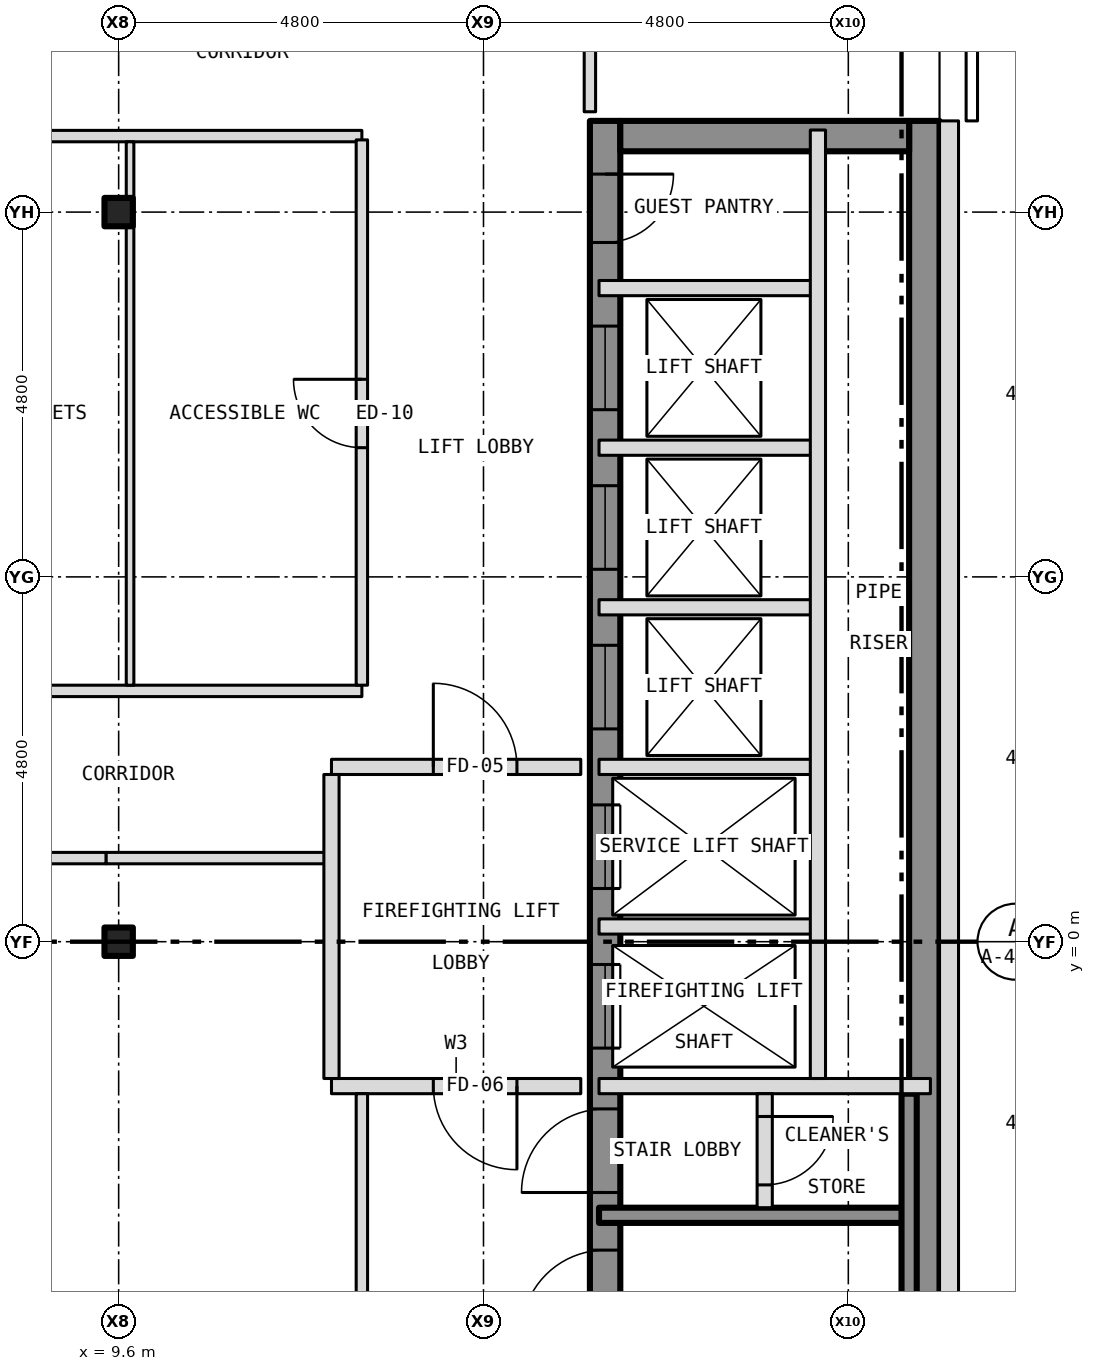
"""IFC4 building model, lengths in metres.
Left out: names, types, materials, properties, quantities, classifications, styles, units other than length and angle.
Written with IfcOpenShell. Run it as: python <this file> out.ifc"""

import sys

from ifc_helpers import new_model, si_unit, direction, frame, frame_2d, origin, origin_2d, place, context, subcontext, project, spatial, rectangle, i_section, extrude, element, fill, save


model = new_model("IFC4")
c1 = context("Model", 3, precision=1e-05, world=origin(), true_north=direction((0.0, 1.0)))
c2 = subcontext(c1, "Body", "Model", "MODEL_VIEW")
j1 = project(units=[si_unit("LENGTHUNIT", "METRE"), si_unit("PLANEANGLEUNIT", "RADIAN")], contexts=[c1])
p1 = place(None, origin())
s1 = spatial("IfcSite", under=j1, at=p1, CompositionType="ELEMENT")
p2 = place(p1, origin())
s2 = spatial("IfcBuilding", under=s1, at=p2, CompositionType="ELEMENT")
p3 = place(p2, frame((0.0, 0.0, 219.0)))
s3 = spatial("IfcBuildingStorey", under=s2, at=p3, CompositionType="ELEMENT", Elevation=219.0)
for number, where, z_axis, x_axis in (
    (1, (9.6, 0.0, -0.15), (0.0, 0.0, 1.0), (1.0, 0.0, 0.0)),
    (2, (9.6, 9.6, -0.15), (0.0, 0.0, 1.0), (1.0, 0.0, 0.0)),
):
    element("IfcColumn", number, at=place(p3, frame(where, z_axis=z_axis, x_axis=x_axis)), inside=s3, PredefinedType="COLUMN", context=c2, shape_type="SweptSolid", body=[
        extrude(i_section(OverallWidth=0.373, OverallDepth=0.373, WebThickness=0.016, FlangeThickness=0.026, at=origin_2d()), origin(), (0.0, 0.0, 1.0), 3.5),
    ])
p4 = place(p3, frame((16.0, -10.8, 0.0), z_axis=(0.0, 0.0, 1.0), x_axis=(0.0, 1.0, 0.0)))
e3 = element("IfcWall", 3, at=p4, inside=s3, PredefinedType="SHEAR", context=c2, shape_type="SweptSolid", body=[
    extrude(rectangle(XDim=21.6, YDim=0.4, at=frame_2d((10.8, 0.0))), origin(), (0.0, 0.0, 1.0), 3.25),
])
p5 = place(p4, frame((9.4, 0.0, 0.0)))
e4 = element("IfcOpeningElement", 4, at=p5, cuts=e3, PredefinedType="OPENING", context=c2, shape_type="SweptSolid", body=[
    extrude(rectangle(XDim=1.1, YDim=2.1, at=frame_2d((0.55, 1.05))), frame((0.0, 0.212, 0.0), z_axis=(0.0, -1.0, 0.0), x_axis=(1.0, 0.0, 0.0)), (0.0, 0.0, 1.0), 0.424),
])
p6 = place(p4, frame((11.5, 0.0, 0.0)))
e5 = element("IfcOpeningElement", 5, at=p6, cuts=e3, PredefinedType="OPENING", context=c2, shape_type="SweptSolid", body=[
    extrude(rectangle(XDim=1.1, YDim=2.1, at=frame_2d((0.55, 1.05))), frame((0.0, 0.212, 0.0), z_axis=(0.0, -1.0, 0.0), x_axis=(1.0, 0.0, 0.0)), (0.0, 0.0, 1.0), 0.424),
])
p7 = place(p4, frame((13.6, 0.0, 0.0)))
e6 = element("IfcOpeningElement", 6, at=p7, cuts=e3, PredefinedType="OPENING", context=c2, shape_type="SweptSolid", body=[
    extrude(rectangle(XDim=1.1, YDim=2.1, at=frame_2d((0.55, 1.05))), frame((0.0, 0.212, 0.0), z_axis=(0.0, -1.0, 0.0), x_axis=(1.0, 0.0, 0.0)), (0.0, 0.0, 1.0), 0.424),
])
p8 = place(p4, frame((15.7, 0.0, 0.0)))
e7 = element("IfcOpeningElement", 7, at=p8, cuts=e3, PredefinedType="OPENING", context=c2, shape_type="SweptSolid", body=[
    extrude(rectangle(XDim=1.1, YDim=2.1, at=frame_2d((0.55, 1.05))), frame((0.0, 0.212, 0.0), z_axis=(0.0, -1.0, 0.0), x_axis=(1.0, 0.0, 0.0)), (0.0, 0.0, 1.0), 0.424),
])
p9 = place(p4, frame((17.8, 0.0, 0.0)))
e8 = element("IfcOpeningElement", 8, at=p9, cuts=e3, PredefinedType="OPENING", context=c2, shape_type="SweptSolid", body=[
    extrude(rectangle(XDim=1.1, YDim=2.1, at=frame_2d((0.55, 1.05))), frame((0.0, 0.212, 0.0), z_axis=(0.0, -1.0, 0.0), x_axis=(1.0, 0.0, 0.0)), (0.0, 0.0, 1.0), 0.424),
])
p10 = place(p4, frame((5.642, 0.0, 0.0)))
e9 = element("IfcOpeningElement", 9, at=p10, cuts=e3, PredefinedType="OPENING", context=c2, shape_type="SweptSolid", body=[
    extrude(rectangle(XDim=1.1, YDim=2.1, at=frame_2d((0.55, 1.05))), frame((0.0, 0.212, 0.0), z_axis=(0.0, -1.0, 0.0), x_axis=(1.0, 0.0, 0.0)), (0.0, 0.0, 1.0), 0.424),
])
p11 = place(p4, frame((7.5, 0.0, 0.0)))
e10 = element("IfcOpeningElement", 10, at=p11, cuts=e3, PredefinedType="OPENING", context=c2, shape_type="SweptSolid", body=[
    extrude(rectangle(XDim=1.1, YDim=2.1, at=frame_2d((0.55, 1.05))), frame((0.0, 0.212, 0.0), z_axis=(0.0, -1.0, 0.0), x_axis=(1.0, 0.0, 0.0)), (0.0, 0.0, 1.0), 0.424),
])
p12 = place(p4, frame((20.0, 0.0, 0.0)))
e11 = element("IfcOpeningElement", 11, at=p12, cuts=e3, PredefinedType="OPENING", context=c2, shape_type="SweptSolid", body=[
    extrude(rectangle(XDim=0.9, YDim=2.1, at=frame_2d((0.45, 1.05))), frame((0.0, 0.212, 0.0), z_axis=(0.0, -1.0, 0.0), x_axis=(1.0, 0.0, 0.0)), (0.0, 0.0, 1.0), 0.424),
])
p13 = place(p3, frame((20.2, -10.8, 0.0), z_axis=(0.0, 0.0, 1.0), x_axis=(0.0, 1.0, 0.0)))
e12 = element("IfcWall", 12, at=p13, inside=s3, PredefinedType="SHEAR", context=c2, shape_type="SweptSolid", body=[
    extrude(rectangle(XDim=21.6, YDim=0.4, at=frame_2d((10.8, 0.0))), origin(), (0.0, 0.0, 1.0), 3.25),
])
p14 = place(p3, frame((16.2, 10.6, 0.0), z_axis=(0.0, 0.0, 1.0), x_axis=(1.0, 0.0, 0.0)))
e13 = element("IfcWall", 13, at=p14, inside=s3, PredefinedType="SHEAR", context=c2, shape_type="SweptSolid", body=[
    extrude(rectangle(XDim=3.8, YDim=0.4, at=frame_2d((1.9, 0.0))), origin(), (0.0, 0.0, 1.0), 3.25),
])
p15 = place(p3, frame((20.525, -10.8, 0.0), z_axis=(0.0, 0.0, 1.0), x_axis=(0.0, 1.0, 0.0)))
e14 = element("IfcWall", 14, at=p15, inside=s3, PredefinedType="SOLIDWALL", context=c2, shape_type="SweptSolid", body=[
    extrude(rectangle(XDim=21.6, YDim=0.25, at=frame_2d((10.8, 0.0))), origin(), (0.0, 0.0, 1.0), 3.5),
])
p16 = place(p15, frame((2.95, 0.0, 1.0)))
e15 = element("IfcOpeningElement", 15, at=p16, cuts=e14, PredefinedType="OPENING", context=c2, shape_type="SweptSolid", body=[
    extrude(rectangle(XDim=0.6, YDim=1.5, at=frame_2d((0.3, 0.75))), frame((0.0, 0.137, 0.0), z_axis=(0.0, -1.0, 0.0), x_axis=(1.0, 0.0, 0.0)), (0.0, 0.0, 1.0), 0.274),
])
p17 = place(p3, frame((15.92, -3.6, 0.0), z_axis=(0.0, 0.0, 1.0), x_axis=(1.0, 0.0, 0.0)))
e16 = element("IfcWall", 16, at=p17, inside=s3, PredefinedType="SHEAR", context=c2, shape_type="SweptSolid", body=[
    extrude(rectangle(XDim=4.08, YDim=0.2, at=frame_2d((2.04, 0.0))), origin(), (0.0, 0.0, 1.0), 3.25),
])
p18 = place(p3, frame((12.4, -1.9, 0.0), z_axis=(0.0, 0.0, 1.0), x_axis=(1.0, 0.0, 0.0)))
e17 = element("IfcWall", 17, at=p18, inside=s3, PredefinedType="PARTITIONING", context=c2, shape_type="SweptSolid", body=[
    extrude(rectangle(XDim=3.28, YDim=0.2, at=frame_2d((1.64, 0.0))), origin(), (0.0, 0.0, 1.0), 3.35),
])
p19 = place(p18, frame((1.34, 0.0, 0.0)))
e18 = element("IfcOpeningElement", 18, at=p19, cuts=e17, PredefinedType="OPENING", context=c2, shape_type="SweptSolid", body=[
    extrude(rectangle(XDim=1.1, YDim=2.1, at=frame_2d((0.55, 1.05))), frame((0.0, 0.112, 0.0), z_axis=(0.0, -1.0, 0.0), x_axis=(1.0, 0.0, 0.0)), (0.0, 0.0, 1.0), 0.224),
])
p20 = place(p3, frame((15.92, -1.9, 0.0), z_axis=(0.0, 0.0, 1.0), x_axis=(1.0, 0.0, 0.0)))
e19 = element("IfcWall", 19, at=p20, inside=s3, PredefinedType="PARTITIONING", context=c2, shape_type="SweptSolid", body=[
    extrude(rectangle(XDim=4.36, YDim=0.2, at=frame_2d((2.18, 0.0))), origin(), (0.0, 0.0, 1.0), 3.25),
])
p21 = place(p3, frame((15.92, 0.2, 0.0), z_axis=(0.0, 0.0, 1.0), x_axis=(1.0, 0.0, 0.0)))
e20 = element("IfcWall", 20, at=p21, inside=s3, PredefinedType="PARTITIONING", context=c2, shape_type="SweptSolid", body=[
    extrude(rectangle(XDim=2.88, YDim=0.2, at=frame_2d((1.44, 0.0))), origin(), (0.0, 0.0, 1.0), 3.25),
])
p22 = place(p3, frame((6.62, 1.1, 0.0), z_axis=(0.0, 0.0, 1.0), x_axis=(1.0, 0.0, 0.0)))
e21 = element("IfcWall", 21, at=p22, inside=s3, PredefinedType="PARTITIONING", context=c2, shape_type="SweptSolid", body=[
    extrude(rectangle(XDim=2.816, YDim=0.15, at=frame_2d((1.408, 0.0))), origin(), (0.0, 0.0, 1.0), 2.593),
])
p23 = place(p3, frame((9.436, 1.1, 0.0), z_axis=(0.0, 0.0, 1.0), x_axis=(1.0, 0.0, 0.0)))
e22 = element("IfcWall", 22, at=p23, inside=s3, PredefinedType="PARTITIONING", context=c2, shape_type="SweptSolid", body=[
    extrude(rectangle(XDim=2.964, YDim=0.15, at=frame_2d((1.482, 0.0))), origin(), (0.0, 0.0, 1.0), 3.35),
])
p24 = place(p3, frame((12.4, 2.3, 0.0), z_axis=(0.0, 0.0, 1.0), x_axis=(1.0, 0.0, 0.0)))
e23 = element("IfcWall", 23, at=p24, inside=s3, PredefinedType="PARTITIONING", context=c2, shape_type="SweptSolid", body=[
    extrude(rectangle(XDim=3.28, YDim=0.2, at=frame_2d((1.64, 0.0))), origin(), (0.0, 0.0, 1.0), 3.35),
])
p25 = place(p24, frame((1.34, 0.0, 0.0)))
e24 = element("IfcOpeningElement", 24, at=p25, cuts=e23, PredefinedType="OPENING", context=c2, shape_type="SweptSolid", body=[
    extrude(rectangle(XDim=1.1, YDim=2.1, at=frame_2d((0.55, 1.05))), frame((0.0, 0.112, 0.0), z_axis=(0.0, -1.0, 0.0), x_axis=(1.0, 0.0, 0.0)), (0.0, 0.0, 1.0), 0.224),
])
p26 = place(p3, frame((15.92, 2.3, 0.0), z_axis=(0.0, 0.0, 1.0), x_axis=(1.0, 0.0, 0.0)))
e25 = element("IfcWall", 25, at=p26, inside=s3, PredefinedType="PARTITIONING", context=c2, shape_type="SweptSolid", body=[
    extrude(rectangle(XDim=2.88, YDim=0.2, at=frame_2d((1.44, 0.0))), origin(), (0.0, 0.0, 1.0), 3.25),
])
p27 = place(p3, frame((6.65, 3.3, 0.0), z_axis=(0.0, 0.0, 1.0), x_axis=(1.0, 0.0, 0.0)))
e26 = element("IfcWall", 26, at=p27, inside=s3, PredefinedType="PARTITIONING", context=c2, shape_type="SweptSolid", body=[
    extrude(rectangle(XDim=6.15, YDim=0.15, at=frame_2d((3.075, 0.0))), origin(), (0.0, 0.0, 1.0), 3.35),
])
p28 = place(p27, frame((1.087, 0.0, 0.0)))
e27 = element("IfcOpeningElement", 27, at=p28, cuts=e26, PredefinedType="OPENING", context=c2, shape_type="SweptSolid", body=[
    extrude(rectangle(XDim=0.9, YDim=2.1, at=frame_2d((0.45, 1.05))), frame((0.0, 0.087, 0.0), z_axis=(0.0, -1.0, 0.0), x_axis=(1.0, 0.0, 0.0)), (0.0, 0.0, 1.0), 0.174),
])
for number, where, z_axis, x_axis in (
    (28, (15.92, 4.4, 0.0), (0.0, 0.0, 1.0), (1.0, 0.0, 0.0)),
    (29, (15.92, 6.5, 0.0), (0.0, 0.0, 1.0), (1.0, 0.0, 0.0)),
    (30, (15.92, 8.6, 0.0), (0.0, 0.0, 1.0), (1.0, 0.0, 0.0)),
):
    element("IfcWall", number, at=place(p3, frame(where, z_axis=z_axis, x_axis=x_axis)), inside=s3, PredefinedType="PARTITIONING", context=c2, shape_type="SweptSolid", body=[
        extrude(rectangle(XDim=2.88, YDim=0.2, at=frame_2d((1.44, 0.0))), origin(), (0.0, 0.0, 1.0), 3.25),
    ])
p29 = place(p3, frame((6.65, 10.6, 0.0), z_axis=(0.0, 0.0, 1.0), x_axis=(1.0, 0.0, 0.0)))
e31 = element("IfcWall", 31, at=p29, inside=s3, PredefinedType="PARTITIONING", context=c2, shape_type="SweptSolid", body=[
    extrude(rectangle(XDim=6.15, YDim=0.15, at=frame_2d((3.075, 0.0))), origin(), (0.0, 0.0, 1.0), 3.35),
])
p30 = place(p3, frame((9.75, 3.375, 0.0), z_axis=(0.0, 0.0, 1.0), x_axis=(0.0, 1.0, 0.0)))
e32 = element("IfcWall", 32, at=p30, inside=s3, PredefinedType="PARTITIONING", context=c2, shape_type="SweptSolid", body=[
    extrude(rectangle(XDim=6.038, YDim=0.1, at=frame_2d((3.019, 0.0))), origin(), (0.0, 0.0, 1.0), 2.728),
])
p31 = place(p3, frame((9.75, 9.413, 0.0), z_axis=(0.0, 0.0, 1.0), x_axis=(0.0, 1.0, 0.0)))
e33 = element("IfcWall", 33, at=p31, inside=s3, PredefinedType="PARTITIONING", context=c2, shape_type="SweptSolid", body=[
    extrude(rectangle(XDim=0.374, YDim=0.1, at=frame_2d((0.187, 0.0))), origin(), (0.0, 0.0, 1.0), 3.35),
])
p32 = place(p3, frame((9.75, 9.787, 0.0), z_axis=(0.0, 0.0, 1.0), x_axis=(0.0, 1.0, 0.0)))
e34 = element("IfcWall", 34, at=p32, inside=s3, PredefinedType="PARTITIONING", context=c2, shape_type="SweptSolid", body=[
    extrude(rectangle(XDim=0.738, YDim=0.1, at=frame_2d((0.369, 0.0))), origin(), (0.0, 0.0, 1.0), 2.728),
])
p33 = place(p3, frame((12.4, -1.8, 0.0), z_axis=(0.0, 0.0, 1.0), x_axis=(0.0, 1.0, 0.0)))
e35 = element("IfcWall", 35, at=p33, inside=s3, PredefinedType="PARTITIONING", context=c2, shape_type="SweptSolid", body=[
    extrude(rectangle(XDim=4.0, YDim=0.2, at=frame_2d((2.0, 0.0))), origin(), (0.0, 0.0, 1.0), 3.35),
])
p34 = place(p3, frame((12.8, -10.525, 0.0), z_axis=(0.0, 0.0, 1.0), x_axis=(0.0, 1.0, 0.0)))
e36 = element("IfcWall", 36, at=p34, inside=s3, PredefinedType="PARTITIONING", context=c2, shape_type="SweptSolid", body=[
    extrude(rectangle(XDim=8.525, YDim=0.15, at=frame_2d((4.262, 0.0))), origin(), (0.0, 0.0, 1.0), 3.35),
])
p35 = place(p34, frame((3.825, 0.0, 0.0)))
e37 = element("IfcOpeningElement", 37, at=p35, cuts=e36, PredefinedType="OPENING", context=c2, shape_type="SweptSolid", body=[
    extrude(rectangle(XDim=0.9, YDim=2.1, at=frame_2d((0.45, 1.05))), frame((0.0, 0.087, 0.0), z_axis=(0.0, -1.0, 0.0), x_axis=(1.0, 0.0, 0.0)), (0.0, 0.0, 1.0), 0.174),
])
p36 = place(p3, frame((12.8, 3.375, 0.0), z_axis=(0.0, 0.0, 1.0), x_axis=(0.0, 1.0, 0.0)))
e38 = element("IfcWall", 38, at=p36, inside=s3, PredefinedType="PARTITIONING", context=c2, shape_type="SweptSolid", body=[
    extrude(rectangle(XDim=7.175, YDim=0.15, at=frame_2d((3.587, 0.0))), origin(), (0.0, 0.0, 1.0), 3.35),
])
p37 = place(p36, frame((3.125, 0.0, 0.0)))
e39 = element("IfcOpeningElement", 39, at=p37, cuts=e38, PredefinedType="OPENING", context=c2, shape_type="SweptSolid", body=[
    extrude(rectangle(XDim=0.9, YDim=2.1, at=frame_2d((0.45, 1.05))), frame((0.0, 0.087, 0.0), z_axis=(0.0, -1.0, 0.0), x_axis=(1.0, 0.0, 0.0)), (0.0, 0.0, 1.0), 0.174),
])
p38 = place(p3, frame((15.8, 10.92, 0.0), z_axis=(0.0, 0.0, 1.0), x_axis=(0.0, 1.0, 0.0)))
e40 = element("IfcWall", 40, at=p38, inside=s3, PredefinedType="PARTITIONING", context=c2, shape_type="SweptSolid", body=[
    extrude(rectangle(XDim=1.805, YDim=0.15, at=frame_2d((0.903, 0.0))), origin(), (0.0, 0.0, 1.0), 3.35),
])
p39 = place(p3, frame((18.1, -3.5, 0.0), z_axis=(0.0, 0.0, 1.0), x_axis=(0.0, 1.0, 0.0)))
e41 = element("IfcWall", 41, at=p39, inside=s3, PredefinedType="PARTITIONING", context=c2, shape_type="SweptSolid", body=[
    extrude(rectangle(XDim=1.5, YDim=0.2, at=frame_2d((0.75, 0.0))), origin(), (0.0, 0.0, 1.0), 3.25),
])
p40 = place(p39, frame((0.3, 0.0, 0.0)))
e42 = element("IfcOpeningElement", 42, at=p40, cuts=e41, PredefinedType="OPENING", context=c2, shape_type="SweptSolid", body=[
    extrude(rectangle(XDim=0.9, YDim=2.1, at=frame_2d((0.45, 1.05))), frame((0.0, 0.112, 0.0), z_axis=(0.0, -1.0, 0.0), x_axis=(1.0, 0.0, 0.0)), (0.0, 0.0, 1.0), 0.224),
])
p41 = place(p3, frame((18.8, -1.8, 0.0), z_axis=(0.0, 0.0, 1.0), x_axis=(0.0, 1.0, 0.0)))
e43 = element("IfcWall", 43, at=p41, inside=s3, PredefinedType="PARTITIONING", context=c2, shape_type="SweptSolid", body=[
    extrude(rectangle(XDim=12.48, YDim=0.2, at=frame_2d((6.24, 0.0))), origin(), (0.0, 0.0, 1.0), 3.25),
])
p42 = place(p3, frame((20.0, -10.68, 0.0), z_axis=(0.0, 0.0, 1.0), x_axis=(0.0, 1.0, 0.0)))
e44 = element("IfcWall", 44, at=p42, inside=s3, PredefinedType="SHEAR", context=c2, shape_type="SweptSolid", body=[
    extrude(rectangle(XDim=8.68, YDim=0.2, at=frame_2d((4.34, 0.0))), origin(), (0.0, 0.0, 1.0), 3.25),
])
p43 = place(p5, origin())
e45 = element("IfcDoor", 45, at=p43, inside=s3, OperationType="SLIDING_TO_LEFT", PredefinedType="DOOR", context=c2, shape_type="SweptSolid", body=[
    extrude(rectangle(XDim=1.1, YDim=2.1, at=frame_2d((0.55, 1.05))), frame((0.0, 0.025, 0.0), z_axis=(0.0, -1.0, 0.0), x_axis=(1.0, 0.0, 0.0)), (0.0, 0.0, 1.0), 0.05),
])
fill(e4, e45)
p44 = place(p6, origin())
e46 = element("IfcDoor", 46, at=p44, inside=s3, OperationType="SLIDING_TO_LEFT", PredefinedType="DOOR", context=c2, shape_type="SweptSolid", body=[
    extrude(rectangle(XDim=1.1, YDim=2.1, at=frame_2d((0.55, 1.05))), frame((0.0, 0.025, 0.0), z_axis=(0.0, -1.0, 0.0), x_axis=(1.0, 0.0, 0.0)), (0.0, 0.0, 1.0), 0.05),
])
fill(e5, e46)
p45 = place(p7, origin())
e47 = element("IfcDoor", 47, at=p45, inside=s3, OperationType="SLIDING_TO_LEFT", PredefinedType="DOOR", context=c2, shape_type="SweptSolid", body=[
    extrude(rectangle(XDim=1.1, YDim=2.1, at=frame_2d((0.55, 1.05))), frame((0.0, 0.025, 0.0), z_axis=(0.0, -1.0, 0.0), x_axis=(1.0, 0.0, 0.0)), (0.0, 0.0, 1.0), 0.05),
])
fill(e6, e47)
p46 = place(p8, origin())
e48 = element("IfcDoor", 48, at=p46, inside=s3, OperationType="SLIDING_TO_LEFT", PredefinedType="DOOR", context=c2, shape_type="SweptSolid", body=[
    extrude(rectangle(XDim=1.1, YDim=2.1, at=frame_2d((0.55, 1.05))), frame((0.0, 0.025, 0.0), z_axis=(0.0, -1.0, 0.0), x_axis=(1.0, 0.0, 0.0)), (0.0, 0.0, 1.0), 0.05),
])
fill(e7, e48)
p47 = place(p9, origin())
e49 = element("IfcDoor", 49, at=p47, inside=s3, OperationType="SLIDING_TO_LEFT", PredefinedType="DOOR", context=c2, shape_type="SweptSolid", body=[
    extrude(rectangle(XDim=1.1, YDim=2.1, at=frame_2d((0.55, 1.05))), frame((0.0, 0.025, 0.0), z_axis=(0.0, -1.0, 0.0), x_axis=(1.0, 0.0, 0.0)), (0.0, 0.0, 1.0), 0.05),
])
fill(e8, e49)
p48 = place(p10, origin())
e50 = element("IfcDoor", 50, at=p48, inside=s3, OperationType="SINGLE_SWING_LEFT", PredefinedType="DOOR", context=c2, shape_type="SweptSolid", body=[
    extrude(rectangle(XDim=1.1, YDim=2.1, at=frame_2d((0.55, 1.05))), frame((0.0, 0.025, 0.0), z_axis=(0.0, -1.0, 0.0), x_axis=(1.0, 0.0, 0.0)), (0.0, 0.0, 1.0), 0.05),
])
fill(e9, e50)
p49 = place(p40, origin())
e51 = element("IfcDoor", 51, at=p49, inside=s3, OperationType="SINGLE_SWING_RIGHT", PredefinedType="DOOR", context=c2, shape_type="SweptSolid", body=[
    extrude(rectangle(XDim=0.9, YDim=2.1, at=frame_2d((0.45, 1.05))), frame((0.0, 0.025, 0.0), z_axis=(0.0, -1.0, 0.0), x_axis=(1.0, 0.0, 0.0)), (0.0, 0.0, 1.0), 0.05),
])
fill(e42, e51)
p50 = place(p11, origin())
e52 = element("IfcDoor", 52, at=p50, inside=s3, OperationType="SINGLE_SWING_LEFT", PredefinedType="DOOR", context=c2, shape_type="SweptSolid", body=[
    extrude(rectangle(XDim=1.1, YDim=2.1, at=frame_2d((0.55, 1.05))), frame((0.0, 0.025, 0.0), z_axis=(0.0, -1.0, 0.0), x_axis=(1.0, 0.0, 0.0)), (0.0, 0.0, 1.0), 0.05),
])
fill(e10, e52)
p51 = place(p12, origin())
e53 = element("IfcDoor", 53, at=p51, inside=s3, OperationType="SINGLE_SWING_RIGHT", PredefinedType="DOOR", context=c2, shape_type="SweptSolid", body=[
    extrude(rectangle(XDim=0.9, YDim=2.1, at=frame_2d((0.45, 1.05))), frame((0.0, 0.025, 0.0), z_axis=(0.0, -1.0, 0.0), x_axis=(1.0, 0.0, 0.0)), (0.0, 0.0, 1.0), 0.05),
])
fill(e11, e53)
p52 = place(p25, origin())
e54 = element("IfcDoor", 54, at=p52, inside=s3, OperationType="SINGLE_SWING_LEFT", PredefinedType="DOOR", context=c2, shape_type="SweptSolid", body=[
    extrude(rectangle(XDim=1.1, YDim=2.1, at=frame_2d((0.55, 1.05))), frame((0.0, 0.025, 0.0), z_axis=(0.0, -1.0, 0.0), x_axis=(1.0, 0.0, 0.0)), (0.0, 0.0, 1.0), 0.05),
])
fill(e24, e54)
p53 = place(p19, origin())
e55 = element("IfcDoor", 55, at=p53, inside=s3, OperationType="SINGLE_SWING_RIGHT", PredefinedType="DOOR", context=c2, shape_type="SweptSolid", body=[
    extrude(rectangle(XDim=1.1, YDim=2.1, at=frame_2d((0.55, 1.05))), frame((0.0, 0.025, 0.0), z_axis=(0.0, -1.0, 0.0), x_axis=(1.0, 0.0, 0.0)), (0.0, 0.0, 1.0), 0.05),
])
fill(e18, e55)
p54 = place(p37, origin())
e56 = element("IfcDoor", 56, at=p54, inside=s3, OperationType="SINGLE_SWING_RIGHT", PredefinedType="DOOR", context=c2, shape_type="SweptSolid", body=[
    extrude(rectangle(XDim=0.9, YDim=2.1, at=frame_2d((0.45, 1.05))), frame((0.0, 0.025, 0.0), z_axis=(0.0, -1.0, 0.0), x_axis=(1.0, 0.0, 0.0)), (0.0, 0.0, 1.0), 0.05),
])
fill(e39, e56)
save(model, sys.argv[1])
